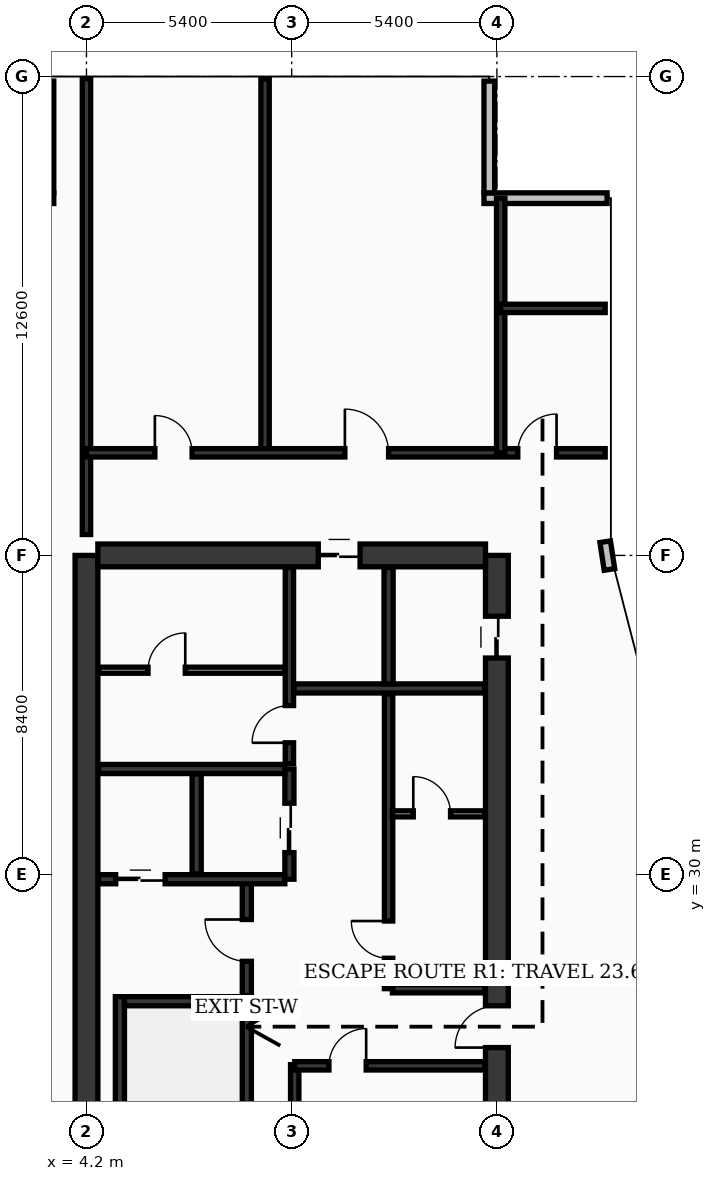
"""IFC4 building model, lengths in metres.
Left out: names, types, materials, properties, quantities, classifications, styles, units other than length and angle.
Written with IfcOpenShell. Run it as: python <this file> out.ifc"""

import sys

from ifc_helpers import new_model, si_unit, direction, frame, frame_2d, origin, origin_2d, place, context, subcontext, project, spatial, rectangle, hollow_rectangle, extrude, element, fill, save


model = new_model("IFC4")
c1 = context("Model", 3, precision=1e-05, world=origin(), true_north=direction((0.0, 1.0)))
c2 = subcontext(c1, "Body", "Model", "MODEL_VIEW")
j1 = project(units=[si_unit("LENGTHUNIT", "METRE"), si_unit("PLANEANGLEUNIT", "RADIAN")], contexts=[c1])
p1 = place(None, origin())
s1 = spatial("IfcSite", under=j1, at=p1, CompositionType="ELEMENT")
p2 = place(p1, origin())
s2 = spatial("IfcBuilding", under=s1, at=p2, CompositionType="ELEMENT")
p3 = place(p2, frame((0.0, 0.0, 282.5)))
s3 = spatial("IfcBuildingStorey", under=s2, at=p3, CompositionType="ELEMENT", Elevation=282.5)
p4 = place(p3, frame((4.2, 16.8, 0.0), z_axis=(0.0, 0.0, 1.0), x_axis=(0.0, 1.0, 0.0)))
e1 = element("IfcWall", 1, at=p4, inside=s3, PredefinedType="SHEAR", context=c2, shape_type="SweptSolid", body=[
    extrude(rectangle(XDim=21.6, YDim=0.6, at=frame_2d((10.8, 0.0))), origin(), (0.0, 0.0, 1.0), 4.35),
])
p5 = place(p3, frame((15.0, 16.8, 0.0), z_axis=(0.0, 0.0, 1.0), x_axis=(0.0, 1.0, 0.0)))
e2 = element("IfcWall", 2, at=p5, inside=s3, PredefinedType="SHEAR", context=c2, shape_type="SweptSolid", body=[
    extrude(rectangle(XDim=21.6, YDim=0.6, at=frame_2d((10.8, 0.0))), origin(), (0.0, 0.0, 1.0), 4.35),
])
p6 = place(p5, frame((8.65, 0.0, 0.0)))
e3 = element("IfcOpeningElement", 3, at=p6, cuts=e2, PredefinedType="OPENING", context=c2, shape_type="SweptSolid", body=[
    extrude(rectangle(XDim=1.1, YDim=2.2, at=frame_2d((0.55, 1.1))), frame((0.0, 0.31, 0.0), z_axis=(0.0, -1.0, 0.0), x_axis=(1.0, 0.0, 0.0)), (0.0, 0.0, 1.0), 0.62),
])
p7 = place(p5, frame((18.9, 0.0, 0.0)))
e4 = element("IfcOpeningElement", 4, at=p7, cuts=e2, PredefinedType="OPENING", context=c2, shape_type="SweptSolid", body=[
    extrude(rectangle(XDim=1.1, YDim=2.2, at=frame_2d((0.55, 1.1))), frame((0.0, 0.31, 0.0), z_axis=(0.0, -1.0, 0.0), x_axis=(1.0, 0.0, 0.0)), (0.0, 0.0, 1.0), 0.62),
])
p8 = place(p3, frame((4.5, 38.4, 0.0), z_axis=(0.0, 0.0, 1.0), x_axis=(1.0, 0.0, 0.0)))
e5 = element("IfcWall", 5, at=p8, inside=s3, PredefinedType="SHEAR", context=c2, shape_type="SweptSolid", body=[
    extrude(rectangle(XDim=10.2, YDim=0.6, at=frame_2d((5.1, 0.0))), origin(), (0.0, 0.0, 1.0), 4.35),
])
p9 = place(p8, frame((5.8, 0.0, 0.0)))
e6 = element("IfcOpeningElement", 6, at=p9, cuts=e5, PredefinedType="OPENING", context=c2, shape_type="SweptSolid", body=[
    extrude(rectangle(XDim=1.1, YDim=2.2, at=frame_2d((0.55, 1.1))), frame((0.0, 0.31, 0.0), z_axis=(0.0, -1.0, 0.0), x_axis=(1.0, 0.0, 0.0)), (0.0, 0.0, 1.0), 0.62),
])
p10 = place(p3, frame((5.08, 17.1, 0.0), z_axis=(0.0, 0.0, 1.0), x_axis=(0.0, 1.0, 0.0)))
e7 = element("IfcWall", 7, at=p10, inside=s3, PredefinedType="SOLIDWALL", context=c2, shape_type="SweptSolid", body=[
    extrude(rectangle(XDim=9.69, YDim=0.24, at=frame_2d((4.845, 0.0))), origin(), (0.0, 0.0, 1.0), 4.35),
])
p11 = place(p3, frame((8.42, 17.1, 0.0), z_axis=(0.0, 0.0, 1.0), x_axis=(0.0, 1.0, 0.0)))
e8 = element("IfcWall", 8, at=p11, inside=s3, PredefinedType="SOLIDWALL", context=c2, shape_type="SweptSolid", body=[
    extrude(rectangle(XDim=9.69, YDim=0.24, at=frame_2d((4.845, 0.0))), origin(), (0.0, 0.0, 1.0), 4.35),
])
p12 = place(p11, frame((0.35, 0.0, 0.0)))
e9 = element("IfcOpeningElement", 9, at=p12, cuts=e8, PredefinedType="OPENING", context=c2, shape_type="SweptSolid", body=[
    extrude(rectangle(XDim=1.15, YDim=2.2, at=frame_2d((0.575, 1.1))), frame((0.0, 0.13, 0.0), z_axis=(0.0, -1.0, 0.0), x_axis=(1.0, 0.0, 0.0)), (0.0, 0.0, 1.0), 0.26),
])
p13 = place(p3, frame((5.2, 26.67, 0.0), z_axis=(0.0, 0.0, 1.0), x_axis=(1.0, 0.0, 0.0)))
e10 = element("IfcWall", 10, at=p13, inside=s3, PredefinedType="SOLIDWALL", context=c2, shape_type="SweptSolid", body=[
    extrude(rectangle(XDim=3.1, YDim=0.24, at=frame_2d((1.55, 0.0))), origin(), (0.0, 0.0, 1.0), 4.35),
])
p14 = place(p3, frame((4.2, 49.55, 0.0), z_axis=(0.0, 0.0, 1.0), x_axis=(1.0, 0.0, 0.0)))
e11 = element("IfcColumn", 11, at=p14, inside=s3, PredefinedType="COLUMN", context=c2, shape_type="SweptSolid", body=[
    extrude(hollow_rectangle(XDim=0.65, YDim=0.65, WallThickness=0.028, at=origin_2d()), origin(), (0.0, 0.0, 1.0), 4.35),
])
p15 = place(p3, frame((16.55, 45.6, 0.0), z_axis=(0.0, 0.0, 1.0), x_axis=(1.0, 0.0, 0.0)))
e12 = element("IfcColumn", 12, at=p15, inside=s3, PredefinedType="COLUMN", context=c2, shape_type="SweptSolid", body=[
    extrude(rectangle(XDim=0.8, YDim=0.8, at=origin_2d()), origin(), (0.0, 0.0, 1.0), 4.35),
])
p16 = place(p3, frame((17.962, 38.03, 0.0), z_axis=(0.0, 0.0, 1.0), x_axis=(-0.15141125477, 0.988470855377, 0.0)))
e13 = element("IfcWall", 13, at=p16, inside=s3, PredefinedType="SOLIDWALL", context=c2, shape_type="SweptSolid", body=[
    extrude(rectangle(XDim=0.739, YDim=0.28, at=frame_2d((0.369, 0.0))), origin(), (0.0, 0.0, 1.0), 4.35),
])
p17 = place(p3, frame((17.9, 47.8, 0.0), z_axis=(0.0, 0.0, 1.0), x_axis=(-1.0, 0.0, 0.0)))
e14 = element("IfcWall", 14, at=p17, inside=s3, PredefinedType="SOLIDWALL", context=c2, shape_type="SweptSolid", body=[
    extrude(rectangle(XDim=3.24, YDim=0.28, at=frame_2d((1.62, 0.0))), origin(), (0.0, 0.0, 1.0), 4.35),
])
p18 = place(p3, frame((14.8, 47.94, 0.0), z_axis=(0.0, 0.0, 1.0), x_axis=(0.0, 1.0, 0.0)))
e15 = element("IfcWall", 15, at=p18, inside=s3, PredefinedType="SOLIDWALL", context=c2, shape_type="SweptSolid", body=[
    extrude(rectangle(XDim=2.94, YDim=0.28, at=frame_2d((1.47, 0.0))), origin(), (0.0, 0.0, 1.0), 4.35),
])
p19 = place(p3, frame((3.2, 50.88, 0.0), z_axis=(0.0, 0.0, 1.0), x_axis=(0.0, -1.0, 0.0)))
e16 = element("IfcWall", 16, at=p19, inside=s3, PredefinedType="SOLIDWALL", context=c2, shape_type="SweptSolid", body=[
    extrude(rectangle(XDim=2.94, YDim=0.28, at=frame_2d((1.47, 0.0))), origin(), (0.0, 0.0, 1.0), 3.9),
])
p20 = place(p3, frame((3.34, 47.8, 0.0), z_axis=(0.0, 0.0, 1.0), x_axis=(-1.0, 0.0, 0.0)))
e17 = element("IfcWall", 17, at=p20, inside=s3, PredefinedType="SOLIDWALL", context=c2, shape_type="SweptSolid", body=[
    extrude(rectangle(XDim=3.22, YDim=0.28, at=frame_2d((1.61, 0.0))), origin(), (0.0, 0.0, 1.0), 3.9),
])
p21 = place(p3, frame((8.42, 26.82, 0.0), z_axis=(0.0, 0.0, 1.0), x_axis=(0.0, 1.0, 0.0)))
e18 = element("IfcWall", 18, at=p21, inside=s3, PredefinedType="SOLIDWALL", context=c2, shape_type="SweptSolid", body=[
    extrude(rectangle(XDim=3.0, YDim=0.24, at=frame_2d((1.5, 0.0))), origin(), (0.0, 0.0, 1.0), 4.35),
])
p22 = place(p21, frame((0.9, 0.0, 0.0)))
e19 = element("IfcOpeningElement", 19, at=p22, cuts=e18, PredefinedType="OPENING", context=c2, shape_type="SweptSolid", body=[
    extrude(rectangle(XDim=1.1, YDim=2.2, at=frame_2d((0.55, 1.1))), frame((0.0, 0.13, 0.0), z_axis=(0.0, -1.0, 0.0), x_axis=(1.0, 0.0, 0.0)), (0.0, 0.0, 1.0), 0.26),
])
p23 = place(p3, frame((4.52, 29.88, 0.0), z_axis=(0.0, 0.0, 1.0), x_axis=(1.0, 0.0, 0.0)))
e20 = element("IfcWall", 20, at=p23, inside=s3, PredefinedType="SOLIDWALL", context=c2, shape_type="SweptSolid", body=[
    extrude(rectangle(XDim=4.9, YDim=0.24, at=frame_2d((2.45, 0.0))), origin(), (0.0, 0.0, 1.0), 4.35),
])
p24 = place(p23, frame((0.45, 0.0, 0.0)))
e21 = element("IfcOpeningElement", 21, at=p24, cuts=e20, PredefinedType="OPENING", context=c2, shape_type="SweptSolid", body=[
    extrude(rectangle(XDim=1.3, YDim=2.35, at=frame_2d((0.65, 1.175))), frame((0.0, 0.13, 0.0), z_axis=(0.0, -1.0, 0.0), x_axis=(1.0, 0.0, 0.0)), (0.0, 0.0, 1.0), 0.26),
])
p25 = place(p3, frame((7.1, 30.02, 0.0), z_axis=(0.0, 0.0, 1.0), x_axis=(0.0, 1.0, 0.0)))
e22 = element("IfcWall", 22, at=p25, inside=s3, PredefinedType="SOLIDWALL", context=c2, shape_type="SweptSolid", body=[
    extrude(rectangle(XDim=2.63, YDim=0.24, at=frame_2d((1.315, 0.0))), origin(), (0.0, 0.0, 1.0), 4.35),
])
p26 = place(p3, frame((9.54, 29.88, 0.0), z_axis=(0.0, 0.0, 1.0), x_axis=(0.0, 1.0, 0.0)))
e23 = element("IfcWall", 23, at=p26, inside=s3, PredefinedType="SOLIDWALL", context=c2, shape_type="SweptSolid", body=[
    extrude(rectangle(XDim=2.9, YDim=0.24, at=frame_2d((1.45, 0.0))), origin(), (0.0, 0.0, 1.0), 4.35),
])
p27 = place(p26, frame((0.7, 0.0, 0.0)))
e24 = element("IfcOpeningElement", 24, at=p27, cuts=e23, PredefinedType="OPENING", context=c2, shape_type="SweptSolid", body=[
    extrude(rectangle(XDim=1.3, YDim=2.35, at=frame_2d((0.65, 1.175))), frame((0.0, 0.13, 0.0), z_axis=(0.0, -1.0, 0.0), x_axis=(1.0, 0.0, 0.0)), (0.0, 0.0, 1.0), 0.26),
])
p28 = place(p3, frame((4.52, 32.78, 0.0), z_axis=(0.0, 0.0, 1.0), x_axis=(1.0, 0.0, 0.0)))
e25 = element("IfcWall", 25, at=p28, inside=s3, PredefinedType="SOLIDWALL", context=c2, shape_type="SweptSolid", body=[
    extrude(rectangle(XDim=4.9, YDim=0.24, at=frame_2d((2.45, 0.0))), origin(), (0.0, 0.0, 1.0), 4.0),
])
p29 = place(p3, frame((9.68, 17.12, 0.0), z_axis=(0.0, 0.0, 1.0), x_axis=(0.0, 1.0, 0.0)))
e26 = element("IfcWall", 26, at=p29, inside=s3, PredefinedType="SOLIDWALL", context=c2, shape_type="SweptSolid", body=[
    extrude(rectangle(XDim=7.88, YDim=0.22, at=frame_2d((3.94, 0.0))), origin(), (0.0, 0.0, 1.0), 4.35),
])
p30 = place(p3, frame((4.52, 35.38, 0.0), z_axis=(0.0, 0.0, 1.0), x_axis=(1.0, 0.0, 0.0)))
e27 = element("IfcWall", 27, at=p30, inside=s3, PredefinedType="PARTITIONING", context=c2, shape_type="SweptSolid", body=[
    extrude(rectangle(XDim=4.9, YDim=0.16, at=frame_2d((2.45, 0.0))), origin(), (0.0, 0.0, 1.0), 4.35),
])
p31 = place(p30, frame((1.3, 0.0, 0.0)))
e28 = element("IfcOpeningElement", 28, at=p31, cuts=e27, PredefinedType="OPENING", context=c2, shape_type="SweptSolid", body=[
    extrude(rectangle(XDim=0.98, YDim=2.15, at=frame_2d((0.49, 1.075))), frame((0.0, 0.09, 0.0), z_axis=(0.0, -1.0, 0.0), x_axis=(1.0, 0.0, 0.0)), (0.0, 0.0, 1.0), 0.18),
])
p32 = place(p3, frame((9.54, 32.92, 0.0), z_axis=(0.0, 0.0, 1.0), x_axis=(0.0, 1.0, 0.0)))
e29 = element("IfcWall", 29, at=p32, inside=s3, PredefinedType="SOLIDWALL", context=c2, shape_type="SweptSolid", body=[
    extrude(rectangle(XDim=5.16, YDim=0.22, at=frame_2d((2.58, 0.0))), origin(), (0.0, 0.0, 1.0), 4.35),
])
p33 = place(p32, frame((0.55, 0.0, 0.0)))
e30 = element("IfcOpeningElement", 30, at=p33, cuts=e29, PredefinedType="OPENING", context=c2, shape_type="SweptSolid", body=[
    extrude(rectangle(XDim=0.98, YDim=2.15, at=frame_2d((0.49, 1.075))), frame((0.0, 0.12, 0.0), z_axis=(0.0, -1.0, 0.0), x_axis=(1.0, 0.0, 0.0)), (0.0, 0.0, 1.0), 0.24),
])
p34 = place(p3, frame((9.68, 24.97, 0.0), z_axis=(0.0, 0.0, 1.0), x_axis=(1.0, 0.0, 0.0)))
e31 = element("IfcWall", 31, at=p34, inside=s3, PredefinedType="SOLIDWALL", context=c2, shape_type="SweptSolid", body=[
    extrude(rectangle(XDim=5.0, YDim=0.22, at=frame_2d((2.5, 0.0))), origin(), (0.0, 0.0, 1.0), 3.8),
])
p35 = place(p34, frame((0.9, 0.0, 0.0)))
e32 = element("IfcOpeningElement", 32, at=p35, cuts=e31, PredefinedType="OPENING", context=c2, shape_type="SweptSolid", body=[
    extrude(rectangle(XDim=0.98, YDim=2.15, at=frame_2d((0.49, 1.075))), frame((0.0, 0.12, 0.0), z_axis=(0.0, -1.0, 0.0), x_axis=(1.0, 0.0, 0.0)), (0.0, 0.0, 1.0), 0.24),
])
p36 = place(p3, frame((12.25, 27.0, 0.0), z_axis=(0.0, 0.0, 1.0), x_axis=(1.0, 0.0, 0.0)))
e33 = element("IfcWall", 33, at=p36, inside=s3, PredefinedType="SOLIDWALL", context=c2, shape_type="SweptSolid", body=[
    extrude(rectangle(XDim=2.43, YDim=0.22, at=frame_2d((1.215, 0.0))), origin(), (0.0, 0.0, 1.0), 4.35),
])
p37 = place(p3, frame((12.15, 27.0, 0.0), z_axis=(0.0, 0.0, 1.0), x_axis=(0.0, 1.0, 0.0)))
e34 = element("IfcWall", 34, at=p37, inside=s3, PredefinedType="SOLIDWALL", context=c2, shape_type="SweptSolid", body=[
    extrude(rectangle(XDim=7.75, YDim=0.22, at=frame_2d((3.875, 0.0))), origin(), (0.0, 0.0, 1.0), 4.35),
])
p38 = place(p37, frame((0.8, 0.0, 0.0)))
e35 = element("IfcOpeningElement", 35, at=p38, cuts=e34, PredefinedType="OPENING", context=c2, shape_type="SweptSolid", body=[
    extrude(rectangle(XDim=0.98, YDim=2.15, at=frame_2d((0.49, 1.075))), frame((0.0, 0.12, 0.0), z_axis=(0.0, -1.0, 0.0), x_axis=(1.0, 0.0, 0.0)), (0.0, 0.0, 1.0), 0.24),
])
p39 = place(p3, frame((12.25, 31.6, 0.0), z_axis=(0.0, 0.0, 1.0), x_axis=(1.0, 0.0, 0.0)))
e36 = element("IfcWall", 36, at=p39, inside=s3, PredefinedType="PARTITIONING", context=c2, shape_type="SweptSolid", body=[
    extrude(rectangle(XDim=2.43, YDim=0.16, at=frame_2d((1.215, 0.0))), origin(), (0.0, 0.0, 1.0), 3.95),
])
p40 = place(p39, frame((0.55, 0.0, 0.0)))
e37 = element("IfcOpeningElement", 37, at=p40, cuts=e36, PredefinedType="OPENING", context=c2, shape_type="SweptSolid", body=[
    extrude(rectangle(XDim=0.98, YDim=2.15, at=frame_2d((0.49, 1.075))), frame((0.0, 0.09, 0.0), z_axis=(0.0, -1.0, 0.0), x_axis=(1.0, 0.0, 0.0)), (0.0, 0.0, 1.0), 0.18),
])
p41 = place(p3, frame((9.66, 34.9, 0.0), z_axis=(0.0, 0.0, 1.0), x_axis=(1.0, 0.0, 0.0)))
e38 = element("IfcWall", 38, at=p41, inside=s3, PredefinedType="SOLIDWALL", context=c2, shape_type="SweptSolid", body=[
    extrude(rectangle(XDim=5.02, YDim=0.24, at=frame_2d((2.51, 0.0))), origin(), (0.0, 0.0, 1.0), 4.35),
])
p42 = place(p3, frame((12.15, 35.02, 0.0), z_axis=(0.0, 0.0, 1.0), x_axis=(0.0, 1.0, 0.0)))
e39 = element("IfcWall", 39, at=p42, inside=s3, PredefinedType="SOLIDWALL", context=c2, shape_type="SweptSolid", body=[
    extrude(rectangle(XDim=3.06, YDim=0.24, at=frame_2d((1.53, 0.0))), origin(), (0.0, 0.0, 1.0), 4.35),
])
p43 = place(p3, frame((4.2, 38.95, 0.0), z_axis=(0.0, 0.0, 1.0), x_axis=(0.0, 1.0, 0.0)))
e40 = element("IfcWall", 40, at=p43, inside=s3, PredefinedType="SOLIDWALL", context=c2, shape_type="SweptSolid", body=[
    extrude(rectangle(XDim=11.99, YDim=0.22, at=frame_2d((5.995, 0.0))), origin(), (0.0, 0.0, 1.0), 3.8),
])
p44 = place(p3, frame((8.9, 41.1, 0.0), z_axis=(0.0, 0.0, 1.0), x_axis=(0.0, 1.0, 0.0)))
e41 = element("IfcWall", 41, at=p44, inside=s3, PredefinedType="SOLIDWALL", context=c2, shape_type="SweptSolid", body=[
    extrude(rectangle(XDim=9.84, YDim=0.22, at=frame_2d((4.92, 0.0))), origin(), (0.0, 0.0, 1.0), 3.9),
])
p45 = place(p3, frame((4.2, 41.1, 0.0), z_axis=(0.0, 0.0, 1.0), x_axis=(1.0, 0.0, 0.0)))
e42 = element("IfcWall", 42, at=p45, inside=s3, PredefinedType="SOLIDWALL", context=c2, shape_type="SweptSolid", body=[
    extrude(rectangle(XDim=13.65, YDim=0.22, at=frame_2d((6.825, 0.0))), origin(), (0.0, 0.0, 1.0), 3.8),
])
p46 = place(p45, frame((1.8, 0.0, 0.0)))
e43 = element("IfcOpeningElement", 43, at=p46, cuts=e42, PredefinedType="OPENING", context=c2, shape_type="SweptSolid", body=[
    extrude(rectangle(XDim=0.98, YDim=2.15, at=frame_2d((0.49, 1.075))), frame((0.0, 0.12, 0.0), z_axis=(0.0, -1.0, 0.0), x_axis=(1.0, 0.0, 0.0)), (0.0, 0.0, 1.0), 0.24),
])
p47 = place(p45, frame((6.8, 0.0, 0.0)))
e44 = element("IfcOpeningElement", 44, at=p47, cuts=e42, PredefinedType="OPENING", context=c2, shape_type="SweptSolid", body=[
    extrude(rectangle(XDim=1.15, YDim=2.2, at=frame_2d((0.575, 1.1))), frame((0.0, 0.12, 0.0), z_axis=(0.0, -1.0, 0.0), x_axis=(1.0, 0.0, 0.0)), (0.0, 0.0, 1.0), 0.24),
])
p48 = place(p45, frame((11.35, 0.0, 0.0)))
e45 = element("IfcOpeningElement", 45, at=p48, cuts=e42, PredefinedType="OPENING", context=c2, shape_type="SweptSolid", body=[
    extrude(rectangle(XDim=1.02, YDim=2.2, at=frame_2d((0.51, 1.1))), frame((0.0, 0.12, 0.0), z_axis=(0.0, -1.0, 0.0), x_axis=(1.0, 0.0, 0.0)), (0.0, 0.0, 1.0), 0.24),
])
p49 = place(p3, frame((15.1, 41.1, 0.0), z_axis=(0.0, 0.0, 1.0), x_axis=(0.0, 1.0, 0.0)))
e46 = element("IfcWall", 46, at=p49, inside=s3, PredefinedType="SOLIDWALL", context=c2, shape_type="SweptSolid", body=[
    extrude(rectangle(XDim=6.7, YDim=0.22, at=frame_2d((3.35, 0.0))), origin(), (0.0, 0.0, 1.0), 3.8),
])
p50 = place(p3, frame((15.1, 44.9, 0.0), z_axis=(0.0, 0.0, 1.0), x_axis=(1.0, 0.0, 0.0)))
e47 = element("IfcWall", 47, at=p50, inside=s3, PredefinedType="SOLIDWALL", context=c2, shape_type="SweptSolid", body=[
    extrude(rectangle(XDim=2.75, YDim=0.22, at=frame_2d((1.375, 0.0))), origin(), (0.0, 0.0, 1.0), 3.8),
])
p51 = place(p22, origin())
e48 = element("IfcDoor", 48, at=p51, inside=s3, OperationType="SINGLE_SWING_RIGHT", PredefinedType="DOOR", context=c2, shape_type="SweptSolid", body=[
    extrude(rectangle(XDim=1.1, YDim=2.2, at=frame_2d((0.55, 1.1))), frame((0.0, 0.025, 0.0), z_axis=(0.0, -1.0, 0.0), x_axis=(1.0, 0.0, 0.0)), (0.0, 0.0, 1.0), 0.05),
])
fill(e19, e48)
p52 = place(p24, origin())
e49 = element("IfcDoor", 49, at=p52, inside=s3, OperationType="DOUBLE_DOOR_SLIDING", PredefinedType="DOOR", context=c2, shape_type="SweptSolid", body=[
    extrude(rectangle(XDim=1.3, YDim=2.35, at=frame_2d((0.65, 1.175))), frame((0.0, 0.025, 0.0), z_axis=(0.0, -1.0, 0.0), x_axis=(1.0, 0.0, 0.0)), (0.0, 0.0, 1.0), 0.05),
])
fill(e21, e49)
p53 = place(p27, origin())
e50 = element("IfcDoor", 50, at=p53, inside=s3, OperationType="DOUBLE_DOOR_SLIDING", PredefinedType="DOOR", context=c2, shape_type="SweptSolid", body=[
    extrude(rectangle(XDim=1.3, YDim=2.35, at=frame_2d((0.65, 1.175))), frame((0.0, 0.025, 0.0), z_axis=(0.0, -1.0, 0.0), x_axis=(1.0, 0.0, 0.0)), (0.0, 0.0, 1.0), 0.05),
])
fill(e24, e50)
p54 = place(p31, origin())
e51 = element("IfcDoor", 51, at=p54, inside=s3, OperationType="SINGLE_SWING_RIGHT", PredefinedType="DOOR", context=c2, shape_type="SweptSolid", body=[
    extrude(rectangle(XDim=0.98, YDim=2.15, at=frame_2d((0.49, 1.075))), frame((0.0, 0.025, 0.0), z_axis=(0.0, -1.0, 0.0), x_axis=(1.0, 0.0, 0.0)), (0.0, 0.0, 1.0), 0.05),
])
fill(e28, e51)
p55 = place(p33, origin())
e52 = element("IfcDoor", 52, at=p55, inside=s3, OperationType="SINGLE_SWING_LEFT", PredefinedType="DOOR", context=c2, shape_type="SweptSolid", body=[
    extrude(rectangle(XDim=0.98, YDim=2.15, at=frame_2d((0.49, 1.075))), frame((0.0, 0.025, 0.0), z_axis=(0.0, -1.0, 0.0), x_axis=(1.0, 0.0, 0.0)), (0.0, 0.0, 1.0), 0.05),
])
fill(e30, e52)
p56 = place(p35, origin())
e53 = element("IfcDoor", 53, at=p56, inside=s3, OperationType="SINGLE_SWING_RIGHT", PredefinedType="DOOR", context=c2, shape_type="SweptSolid", body=[
    extrude(rectangle(XDim=0.98, YDim=2.15, at=frame_2d((0.49, 1.075))), frame((0.0, 0.025, 0.0), z_axis=(0.0, -1.0, 0.0), x_axis=(1.0, 0.0, 0.0)), (0.0, 0.0, 1.0), 0.05),
])
fill(e32, e53)
p57 = place(p38, origin())
e54 = element("IfcDoor", 54, at=p57, inside=s3, OperationType="SINGLE_SWING_RIGHT", PredefinedType="DOOR", context=c2, shape_type="SweptSolid", body=[
    extrude(rectangle(XDim=0.98, YDim=2.15, at=frame_2d((0.49, 1.075))), frame((0.0, 0.025, 0.0), z_axis=(0.0, -1.0, 0.0), x_axis=(1.0, 0.0, 0.0)), (0.0, 0.0, 1.0), 0.05),
])
fill(e35, e54)
p58 = place(p40, origin())
e55 = element("IfcDoor", 55, at=p58, inside=s3, OperationType="SINGLE_SWING_LEFT", PredefinedType="DOOR", context=c2, shape_type="SweptSolid", body=[
    extrude(rectangle(XDim=0.98, YDim=2.15, at=frame_2d((0.49, 1.075))), frame((0.0, 0.025, 0.0), z_axis=(0.0, -1.0, 0.0), x_axis=(1.0, 0.0, 0.0)), (0.0, 0.0, 1.0), 0.05),
])
fill(e37, e55)
p59 = place(p46, origin())
e56 = element("IfcDoor", 56, at=p59, inside=s3, OperationType="SINGLE_SWING_LEFT", PredefinedType="DOOR", context=c2, shape_type="SweptSolid", body=[
    extrude(rectangle(XDim=0.98, YDim=2.15, at=frame_2d((0.49, 1.075))), frame((0.0, 0.025, 0.0), z_axis=(0.0, -1.0, 0.0), x_axis=(1.0, 0.0, 0.0)), (0.0, 0.0, 1.0), 0.05),
])
fill(e43, e56)
p60 = place(p47, origin())
e57 = element("IfcDoor", 57, at=p60, inside=s3, OperationType="SINGLE_SWING_LEFT", PredefinedType="DOOR", context=c2, shape_type="SweptSolid", body=[
    extrude(rectangle(XDim=1.15, YDim=2.2, at=frame_2d((0.575, 1.1))), frame((0.0, 0.025, 0.0), z_axis=(0.0, -1.0, 0.0), x_axis=(1.0, 0.0, 0.0)), (0.0, 0.0, 1.0), 0.05),
])
fill(e44, e57)
p61 = place(p48, origin())
e58 = element("IfcDoor", 58, at=p61, inside=s3, OperationType="SINGLE_SWING_RIGHT", PredefinedType="DOOR", context=c2, shape_type="SweptSolid", body=[
    extrude(rectangle(XDim=1.02, YDim=2.2, at=frame_2d((0.51, 1.1))), frame((0.0, 0.025, 0.0), z_axis=(0.0, -1.0, 0.0), x_axis=(1.0, 0.0, 0.0)), (0.0, 0.0, 1.0), 0.05),
])
fill(e45, e58)
p62 = place(p6, origin())
e59 = element("IfcDoor", 59, at=p62, inside=s3, OperationType="SINGLE_SWING_LEFT", PredefinedType="DOOR", context=c2, shape_type="SweptSolid", body=[
    extrude(rectangle(XDim=1.1, YDim=2.2, at=frame_2d((0.55, 1.1))), frame((0.0, 0.025, 0.0), z_axis=(0.0, -1.0, 0.0), x_axis=(1.0, 0.0, 0.0)), (0.0, 0.0, 1.0), 0.05),
])
fill(e3, e59)
p63 = place(p7, origin())
e60 = element("IfcDoor", 60, at=p63, inside=s3, OperationType="DOUBLE_DOOR_SLIDING", PredefinedType="DOOR", context=c2, shape_type="SweptSolid", body=[
    extrude(rectangle(XDim=1.1, YDim=2.2, at=frame_2d((0.55, 1.1))), frame((0.0, 0.025, 0.0), z_axis=(0.0, -1.0, 0.0), x_axis=(1.0, 0.0, 0.0)), (0.0, 0.0, 1.0), 0.05),
])
fill(e4, e60)
p64 = place(p9, origin())
e61 = element("IfcDoor", 61, at=p64, inside=s3, OperationType="DOUBLE_DOOR_SLIDING", PredefinedType="DOOR", context=c2, shape_type="SweptSolid", body=[
    extrude(rectangle(XDim=1.1, YDim=2.2, at=frame_2d((0.55, 1.1))), frame((0.0, 0.025, 0.0), z_axis=(0.0, -1.0, 0.0), x_axis=(1.0, 0.0, 0.0)), (0.0, 0.0, 1.0), 0.05),
])
fill(e6, e61)
save(model, sys.argv[1])
